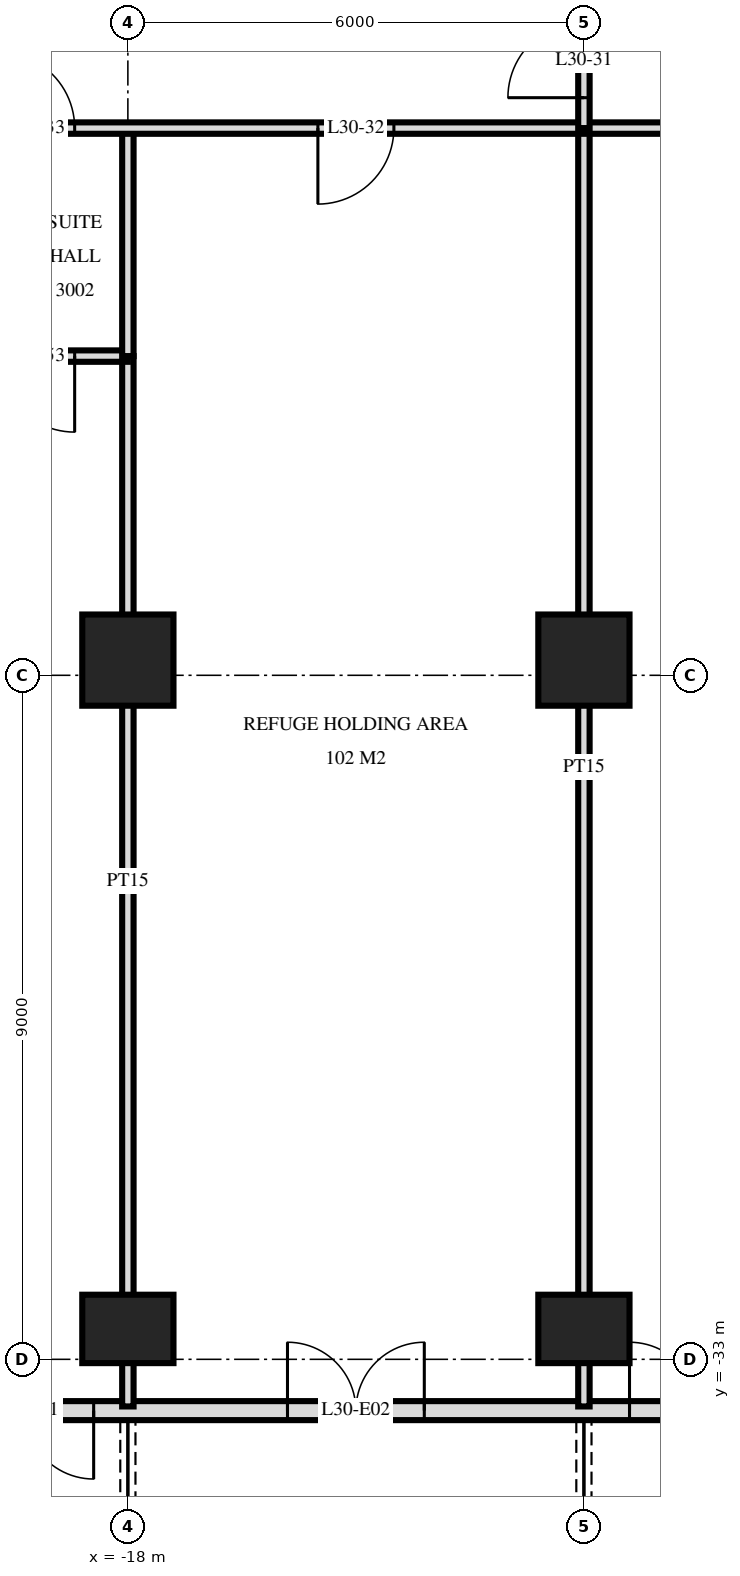
"""IFC4 building model, lengths in metres.
Left out: names, types, materials, properties, quantities, classifications, styles, units other than length and angle.
Written with IfcOpenShell. Run it as: python <this file> out.ifc"""

import sys

from ifc_helpers import new_model, si_unit, direction, frame, frame_2d, origin, origin_2d, place, context, subcontext, project, spatial, rectangle, extrude, element, fill, save


model = new_model("IFC4")
c1 = context("Model", 3, precision=1e-05, world=origin(), true_north=direction((0.0, 1.0)))
c2 = subcontext(c1, "Body", "Model", "MODEL_VIEW")
j1 = project(units=[si_unit("LENGTHUNIT", "METRE"), si_unit("PLANEANGLEUNIT", "RADIAN")], contexts=[c1])
p1 = place(None, origin())
s1 = spatial("IfcSite", under=j1, at=p1, CompositionType="ELEMENT")
p2 = place(p1, origin())
s2 = spatial("IfcBuilding", under=s1, at=p2, CompositionType="ELEMENT")
p3 = place(p2, frame((0.0, 0.0, 120.0)))
s3 = spatial("IfcBuildingStorey", under=s2, at=p3, CompositionType="ELEMENT", Elevation=120.0)
p4 = place(p3, frame((-18.0, -32.6, 0.0), z_axis=(0.0, 0.0, 1.0), x_axis=(1.0, 0.0, 0.0)))
e1 = element("IfcColumn", 1, at=p4, inside=s3, PredefinedType="COLUMN", context=c2, shape_type="SweptSolid", body=[
    extrude(rectangle(XDim=1.2, YDim=0.9, at=origin_2d()), origin(), (0.0, 0.0, 1.0), 3.6),
])
p5 = place(p3, frame((-18.0, -23.8, 0.0), z_axis=(0.0, 0.0, 1.0), x_axis=(1.0, 0.0, 0.0)))
e2 = element("IfcColumn", 2, at=p5, inside=s3, PredefinedType="COLUMN", context=c2, shape_type="SweptSolid", body=[
    extrude(rectangle(XDim=1.2, YDim=1.2, at=origin_2d()), origin(), (0.0, 0.0, 1.0), 3.6),
])
p6 = place(p3, frame((-12.0, -32.6, 0.0), z_axis=(0.0, 0.0, 1.0), x_axis=(1.0, 0.0, 0.0)))
e3 = element("IfcColumn", 3, at=p6, inside=s3, PredefinedType="COLUMN", context=c2, shape_type="SweptSolid", body=[
    extrude(rectangle(XDim=1.2, YDim=0.9, at=origin_2d()), origin(), (0.0, 0.0, 1.0), 3.6),
])
p7 = place(p3, frame((-12.0, -23.8, 0.0), z_axis=(0.0, 0.0, 1.0), x_axis=(1.0, 0.0, 0.0)))
e4 = element("IfcColumn", 4, at=p7, inside=s3, PredefinedType="COLUMN", context=c2, shape_type="SweptSolid", body=[
    extrude(rectangle(XDim=1.2, YDim=1.2, at=origin_2d()), origin(), (0.0, 0.0, 1.0), 3.6),
])
p8 = place(p3, frame((-23.675, -33.675, 0.0), z_axis=(0.0, 0.0, 1.0), x_axis=(1.0, 0.0, 0.0)))
e5 = element("IfcWall", 5, at=p8, inside=s3, PredefinedType="SOLIDWALL", context=c2, shape_type="SweptSolid", body=[
    extrude(rectangle(XDim=47.351, YDim=0.25, at=frame_2d((23.675, 0.0))), origin(), (0.0, 0.0, 1.0), 3.32),
])
p9 = place(p8, frame((0.275, 0.0, 0.3)))
e6 = element("IfcOpeningElement", 6, at=p9, cuts=e5, PredefinedType="OPENING", context=c2, shape_type="SweptSolid", body=[
    extrude(rectangle(XDim=2.4, YDim=2.1, at=frame_2d((1.2, 1.05))), frame((0.0, 0.135, 0.0), z_axis=(0.0, -1.0, 0.0), x_axis=(1.0, 0.0, 0.0)), (0.0, 0.0, 1.0), 0.27),
])
p10 = place(p8, frame((3.425, 0.0, 0.0)))
e7 = element("IfcOpeningElement", 7, at=p10, cuts=e5, PredefinedType="OPENING", context=c2, shape_type="SweptSolid", body=[
    extrude(rectangle(XDim=1.8, YDim=2.4, at=frame_2d((0.9, 1.2))), frame((0.0, 0.135, 0.0), z_axis=(0.0, -1.0, 0.0), x_axis=(1.0, 0.0, 0.0)), (0.0, 0.0, 1.0), 0.27),
])
p11 = place(p8, frame((7.775, 0.0, 0.0)))
e8 = element("IfcOpeningElement", 8, at=p11, cuts=e5, PredefinedType="OPENING", context=c2, shape_type="SweptSolid", body=[
    extrude(rectangle(XDim=1.8, YDim=2.4, at=frame_2d((0.9, 1.2))), frame((0.0, 0.135, 0.0), z_axis=(0.0, -1.0, 0.0), x_axis=(1.0, 0.0, 0.0)), (0.0, 0.0, 1.0), 0.27),
])
p12 = place(p8, frame((12.275, 0.0, 0.0)))
e9 = element("IfcOpeningElement", 9, at=p12, cuts=e5, PredefinedType="OPENING", context=c2, shape_type="SweptSolid", body=[
    extrude(rectangle(XDim=1.8, YDim=2.4, at=frame_2d((0.9, 1.2))), frame((0.0, 0.135, 0.0), z_axis=(0.0, -1.0, 0.0), x_axis=(1.0, 0.0, 0.0)), (0.0, 0.0, 1.0), 0.27),
])
p13 = place(p8, frame((14.975, 0.0, 0.3)))
e10 = element("IfcOpeningElement", 10, at=p13, cuts=e5, PredefinedType="OPENING", context=c2, shape_type="SweptSolid", body=[
    extrude(rectangle(XDim=2.4, YDim=2.1, at=frame_2d((1.2, 1.05))), frame((0.0, 0.135, 0.0), z_axis=(0.0, -1.0, 0.0), x_axis=(1.0, 0.0, 0.0)), (0.0, 0.0, 1.0), 0.27),
])
p14 = place(p8, frame((17.975, 0.0, 0.3)))
e11 = element("IfcOpeningElement", 11, at=p14, cuts=e5, PredefinedType="OPENING", context=c2, shape_type="SweptSolid", body=[
    extrude(rectangle(XDim=2.4, YDim=2.1, at=frame_2d((1.2, 1.05))), frame((0.0, 0.135, 0.0), z_axis=(0.0, -1.0, 0.0), x_axis=(1.0, 0.0, 0.0)), (0.0, 0.0, 1.0), 0.27),
])
p15 = place(p8, frame((21.275, 0.0, 0.0)))
e12 = element("IfcOpeningElement", 12, at=p15, cuts=e5, PredefinedType="OPENING", context=c2, shape_type="SweptSolid", body=[
    extrude(rectangle(XDim=1.8, YDim=2.4, at=frame_2d((0.9, 1.2))), frame((0.0, 0.135, 0.0), z_axis=(0.0, -1.0, 0.0), x_axis=(1.0, 0.0, 0.0)), (0.0, 0.0, 1.0), 0.27),
])
p16 = place(p8, frame((24.275, 0.0, 0.0)))
e13 = element("IfcOpeningElement", 13, at=p16, cuts=e5, PredefinedType="OPENING", context=c2, shape_type="SweptSolid", body=[
    extrude(rectangle(XDim=1.8, YDim=2.4, at=frame_2d((0.9, 1.2))), frame((0.0, 0.135, 0.0), z_axis=(0.0, -1.0, 0.0), x_axis=(1.0, 0.0, 0.0)), (0.0, 0.0, 1.0), 0.27),
])
p17 = place(p8, frame((26.975, 0.0, 0.3)))
e14 = element("IfcOpeningElement", 14, at=p17, cuts=e5, PredefinedType="OPENING", context=c2, shape_type="SweptSolid", body=[
    extrude(rectangle(XDim=2.4, YDim=2.1, at=frame_2d((1.2, 1.05))), frame((0.0, 0.135, 0.0), z_axis=(0.0, -1.0, 0.0), x_axis=(1.0, 0.0, 0.0)), (0.0, 0.0, 1.0), 0.27),
])
p18 = place(p8, frame((30.275, 0.0, 0.0)))
e15 = element("IfcOpeningElement", 15, at=p18, cuts=e5, PredefinedType="OPENING", context=c2, shape_type="SweptSolid", body=[
    extrude(rectangle(XDim=1.8, YDim=2.4, at=frame_2d((0.9, 1.2))), frame((0.0, 0.135, 0.0), z_axis=(0.0, -1.0, 0.0), x_axis=(1.0, 0.0, 0.0)), (0.0, 0.0, 1.0), 0.27),
])
p19 = place(p8, frame((32.975, 0.0, 0.3)))
e16 = element("IfcOpeningElement", 16, at=p19, cuts=e5, PredefinedType="OPENING", context=c2, shape_type="SweptSolid", body=[
    extrude(rectangle(XDim=2.4, YDim=2.1, at=frame_2d((1.2, 1.05))), frame((0.0, 0.135, 0.0), z_axis=(0.0, -1.0, 0.0), x_axis=(1.0, 0.0, 0.0)), (0.0, 0.0, 1.0), 0.27),
])
p20 = place(p8, frame((35.975, 0.0, 0.3)))
e17 = element("IfcOpeningElement", 17, at=p20, cuts=e5, PredefinedType="OPENING", context=c2, shape_type="SweptSolid", body=[
    extrude(rectangle(XDim=2.4, YDim=2.1, at=frame_2d((1.2, 1.05))), frame((0.0, 0.135, 0.0), z_axis=(0.0, -1.0, 0.0), x_axis=(1.0, 0.0, 0.0)), (0.0, 0.0, 1.0), 0.27),
])
p21 = place(p8, frame((39.275, 0.0, 0.0)))
e18 = element("IfcOpeningElement", 18, at=p21, cuts=e5, PredefinedType="OPENING", context=c2, shape_type="SweptSolid", body=[
    extrude(rectangle(XDim=1.8, YDim=2.4, at=frame_2d((0.9, 1.2))), frame((0.0, 0.135, 0.0), z_axis=(0.0, -1.0, 0.0), x_axis=(1.0, 0.0, 0.0)), (0.0, 0.0, 1.0), 0.27),
])
p22 = place(p8, frame((41.975, 0.0, 0.3)))
e19 = element("IfcOpeningElement", 19, at=p22, cuts=e5, PredefinedType="OPENING", context=c2, shape_type="SweptSolid", body=[
    extrude(rectangle(XDim=2.4, YDim=2.1, at=frame_2d((1.2, 1.05))), frame((0.0, 0.135, 0.0), z_axis=(0.0, -1.0, 0.0), x_axis=(1.0, 0.0, 0.0)), (0.0, 0.0, 1.0), 0.27),
])
p23 = place(p8, frame((45.125, 0.0, 0.0)))
e20 = element("IfcOpeningElement", 20, at=p23, cuts=e5, PredefinedType="OPENING", context=c2, shape_type="SweptSolid", body=[
    extrude(rectangle(XDim=1.8, YDim=2.4, at=frame_2d((0.9, 1.2))), frame((0.0, 0.135, 0.0), z_axis=(0.0, -1.0, 0.0), x_axis=(1.0, 0.0, 0.0)), (0.0, 0.0, 1.0), 0.27),
])
p24 = place(p3, frame((-12.0, -16.8, 0.0), z_axis=(0.0, 0.0, 1.0), x_axis=(0.0, 1.0, 0.0)))
e21 = element("IfcWall", 21, at=p24, inside=s3, PredefinedType="PARTITIONING", context=c2, shape_type="SweptSolid", body=[
    extrude(rectangle(XDim=1.75, YDim=0.15, at=frame_2d((0.875, 0.0))), origin(), (0.0, 0.0, 1.0), 3.32),
])
p25 = place(p24, frame((0.4, 0.0, 0.0)))
e22 = element("IfcOpeningElement", 22, at=p25, cuts=e21, PredefinedType="OPENING", context=c2, shape_type="SweptSolid", body=[
    extrude(rectangle(XDim=1.0, YDim=2.1, at=frame_2d((0.5, 1.05))), frame((0.0, 0.085, 0.0), z_axis=(0.0, -1.0, 0.0), x_axis=(1.0, 0.0, 0.0)), (0.0, 0.0, 1.0), 0.17),
])
p26 = place(p3, frame((-12.0, -33.62, 0.0), z_axis=(0.0, 0.0, 1.0), x_axis=(0.0, 1.0, 0.0)))
e23 = element("IfcWall", 23, at=p26, inside=s3, PredefinedType="PARTITIONING", context=c2, shape_type="SweptSolid", body=[
    extrude(rectangle(XDim=16.82, YDim=0.15, at=frame_2d((8.41, 0.0))), origin(), (0.0, 0.0, 1.0), 3.32),
])
p27 = place(p3, frame((-18.0, -19.8, 0.0), z_axis=(0.0, 0.0, 1.0), x_axis=(0.0, 1.0, 0.0)))
e24 = element("IfcWall", 24, at=p27, inside=s3, PredefinedType="PARTITIONING", context=c2, shape_type="SweptSolid", body=[
    extrude(rectangle(XDim=3.0, YDim=0.15, at=frame_2d((1.5, 0.0))), origin(), (0.0, 0.0, 1.0), 3.32),
])
p28 = place(p3, frame((-18.0, -33.62, 0.0), z_axis=(0.0, 0.0, 1.0), x_axis=(0.0, 1.0, 0.0)))
e25 = element("IfcWall", 25, at=p28, inside=s3, PredefinedType="PARTITIONING", context=c2, shape_type="SweptSolid", body=[
    extrude(rectangle(XDim=13.82, YDim=0.15, at=frame_2d((6.91, 0.0))), origin(), (0.0, 0.0, 1.0), 3.32),
])
p29 = place(p3, frame((-20.4, -19.8, 0.0), z_axis=(0.0, 0.0, 1.0), x_axis=(1.0, 0.0, 0.0)))
e26 = element("IfcWall", 26, at=p29, inside=s3, PredefinedType="PARTITIONING", context=c2, shape_type="SweptSolid", body=[
    extrude(rectangle(XDim=2.4, YDim=0.15, at=frame_2d((1.2, 0.0))), origin(), (0.0, 0.0, 1.0), 3.32),
])
p30 = place(p29, frame((0.7, 0.0, 0.0)))
e27 = element("IfcOpeningElement", 27, at=p30, cuts=e26, PredefinedType="OPENING", context=c2, shape_type="SweptSolid", body=[
    extrude(rectangle(XDim=1.0, YDim=2.1, at=frame_2d((0.5, 1.05))), frame((0.0, 0.085, 0.0), z_axis=(0.0, -1.0, 0.0), x_axis=(1.0, 0.0, 0.0)), (0.0, 0.0, 1.0), 0.17),
])
p31 = place(p3, frame((-28.02, -16.8, 0.0), z_axis=(0.0, 0.0, 1.0), x_axis=(1.0, 0.0, 0.0)))
e28 = element("IfcWall", 28, at=p31, inside=s3, PredefinedType="PARTITIONING", context=c2, shape_type="SweptSolid", body=[
    extrude(rectangle(XDim=56.04, YDim=0.15, at=frame_2d((28.02, 0.0))), origin(), (0.0, 0.0, 1.0), 3.32),
])
p32 = place(p31, frame((12.52, 0.0, 0.0)))
e29 = element("IfcOpeningElement", 29, at=p32, cuts=e28, PredefinedType="OPENING", context=c2, shape_type="SweptSolid", body=[
    extrude(rectangle(XDim=1.0, YDim=2.1, at=frame_2d((0.5, 1.05))), frame((0.0, 0.085, 0.0), z_axis=(0.0, -1.0, 0.0), x_axis=(1.0, 0.0, 0.0)), (0.0, 0.0, 1.0), 0.17),
])
p33 = place(p31, frame((8.32, 0.0, 0.0)))
e30 = element("IfcOpeningElement", 30, at=p33, cuts=e28, PredefinedType="OPENING", context=c2, shape_type="SweptSolid", body=[
    extrude(rectangle(XDim=1.0, YDim=2.1, at=frame_2d((0.5, 1.05))), frame((0.0, 0.085, 0.0), z_axis=(0.0, -1.0, 0.0), x_axis=(1.0, 0.0, 0.0)), (0.0, 0.0, 1.0), 0.17),
])
p34 = place(p31, frame((40.42, 0.0, 0.0)))
e31 = element("IfcOpeningElement", 31, at=p34, cuts=e28, PredefinedType="OPENING", context=c2, shape_type="SweptSolid", body=[
    extrude(rectangle(XDim=1.0, YDim=2.1, at=frame_2d((0.5, 1.05))), frame((0.0, 0.085, 0.0), z_axis=(0.0, -1.0, 0.0), x_axis=(1.0, 0.0, 0.0)), (0.0, 0.0, 1.0), 0.17),
])
p35 = place(p31, frame((46.72, 0.0, 0.0)))
e32 = element("IfcOpeningElement", 32, at=p35, cuts=e28, PredefinedType="OPENING", context=c2, shape_type="SweptSolid", body=[
    extrude(rectangle(XDim=1.0, YDim=2.1, at=frame_2d((0.5, 1.05))), frame((0.0, 0.085, 0.0), z_axis=(0.0, -1.0, 0.0), x_axis=(1.0, 0.0, 0.0)), (0.0, 0.0, 1.0), 0.17),
])
p36 = place(p31, frame((21.52, 0.0, 0.0)))
e33 = element("IfcOpeningElement", 33, at=p36, cuts=e28, PredefinedType="OPENING", context=c2, shape_type="SweptSolid", body=[
    extrude(rectangle(XDim=1.0, YDim=2.1, at=frame_2d((0.5, 1.05))), frame((0.0, 0.085, 0.0), z_axis=(0.0, -1.0, 0.0), x_axis=(1.0, 0.0, 0.0)), (0.0, 0.0, 1.0), 0.17),
])
p37 = place(p31, frame((30.52, 0.0, 0.0)))
e34 = element("IfcOpeningElement", 34, at=p37, cuts=e28, PredefinedType="OPENING", context=c2, shape_type="SweptSolid", body=[
    extrude(rectangle(XDim=1.0, YDim=2.1, at=frame_2d((0.5, 1.05))), frame((0.0, 0.085, 0.0), z_axis=(0.0, -1.0, 0.0), x_axis=(1.0, 0.0, 0.0)), (0.0, 0.0, 1.0), 0.17),
])
p38 = place(p31, frame((36.52, 0.0, 0.0)))
e35 = element("IfcOpeningElement", 35, at=p38, cuts=e28, PredefinedType="OPENING", context=c2, shape_type="SweptSolid", body=[
    extrude(rectangle(XDim=1.0, YDim=2.1, at=frame_2d((0.5, 1.05))), frame((0.0, 0.085, 0.0), z_axis=(0.0, -1.0, 0.0), x_axis=(1.0, 0.0, 0.0)), (0.0, 0.0, 1.0), 0.17),
])
p39 = place(p10, frame((0.9, 0.0, 0.0), z_axis=(0.0, 0.0, 1.0), x_axis=(-1.0, 0.0, 0.0)))
e36 = element("IfcDoor", 36, at=p39, inside=s3, OperationType="DOUBLE_DOOR_SINGLE_SWING", PredefinedType="DOOR", context=c2, shape_type="SweptSolid", body=[
    extrude(rectangle(XDim=1.8, YDim=2.4, at=frame_2d((0.0, 1.2))), frame((0.0, -0.025, 0.0), z_axis=(0.0, 1.0, 0.0), x_axis=(-1.0, 0.0, 0.0)), (0.0, 0.0, 1.0), 0.05),
])
fill(e7, e36)
p40 = place(p11, origin())
e37 = element("IfcDoor", 37, at=p40, inside=s3, OperationType="DOUBLE_DOOR_SINGLE_SWING", PredefinedType="DOOR", context=c2, shape_type="SweptSolid", body=[
    extrude(rectangle(XDim=1.8, YDim=2.4, at=frame_2d((0.9, 1.2))), frame((0.0, 0.025, 0.0), z_axis=(0.0, -1.0, 0.0), x_axis=(1.0, 0.0, 0.0)), (0.0, 0.0, 1.0), 0.05),
])
fill(e8, e37)
p41 = place(p12, origin())
e38 = element("IfcDoor", 38, at=p41, inside=s3, OperationType="DOUBLE_DOOR_SINGLE_SWING", PredefinedType="DOOR", context=c2, shape_type="SweptSolid", body=[
    extrude(rectangle(XDim=1.8, YDim=2.4, at=frame_2d((0.9, 1.2))), frame((0.0, 0.025, 0.0), z_axis=(0.0, -1.0, 0.0), x_axis=(1.0, 0.0, 0.0)), (0.0, 0.0, 1.0), 0.05),
])
fill(e9, e38)
p42 = place(p25, origin())
e39 = element("IfcDoor", 39, at=p42, inside=s3, OperationType="SINGLE_SWING_RIGHT", PredefinedType="DOOR", context=c2, shape_type="SweptSolid", body=[
    extrude(rectangle(XDim=1.0, YDim=2.1, at=frame_2d((0.5, 1.05))), frame((0.0, 0.025, 0.0), z_axis=(0.0, -1.0, 0.0), x_axis=(1.0, 0.0, 0.0)), (0.0, 0.0, 1.0), 0.05),
])
fill(e22, e39)
p43 = place(p32, frame((0.5, 0.0, 0.0), z_axis=(0.0, 0.0, 1.0), x_axis=(-1.0, 0.0, 0.0)))
e40 = element("IfcDoor", 40, at=p43, inside=s3, OperationType="SINGLE_SWING_LEFT", PredefinedType="DOOR", context=c2, shape_type="SweptSolid", body=[
    extrude(rectangle(XDim=1.0, YDim=2.1, at=frame_2d((0.0, 1.05))), frame((0.0, -0.025, 0.0), z_axis=(0.0, 1.0, 0.0), x_axis=(-1.0, 0.0, 0.0)), (0.0, 0.0, 1.0), 0.05),
])
fill(e29, e40)
p44 = place(p33, origin())
e41 = element("IfcDoor", 41, at=p44, inside=s3, OperationType="SINGLE_SWING_RIGHT", PredefinedType="DOOR", context=c2, shape_type="SweptSolid", body=[
    extrude(rectangle(XDim=1.0, YDim=2.1, at=frame_2d((0.5, 1.05))), frame((0.0, 0.025, 0.0), z_axis=(0.0, -1.0, 0.0), x_axis=(1.0, 0.0, 0.0)), (0.0, 0.0, 1.0), 0.05),
])
fill(e30, e41)
p45 = place(p30, frame((0.5, 0.0, 0.0), z_axis=(0.0, 0.0, 1.0), x_axis=(-1.0, 0.0, 0.0)))
e42 = element("IfcDoor", 42, at=p45, inside=s3, OperationType="SINGLE_SWING_RIGHT", PredefinedType="DOOR", context=c2, shape_type="SweptSolid", body=[
    extrude(rectangle(XDim=1.0, YDim=2.1, at=frame_2d((0.0, 1.05))), frame((0.0, -0.025, 0.0), z_axis=(0.0, 1.0, 0.0), x_axis=(-1.0, 0.0, 0.0)), (0.0, 0.0, 1.0), 0.05),
])
fill(e27, e42)
save(model, sys.argv[1])
